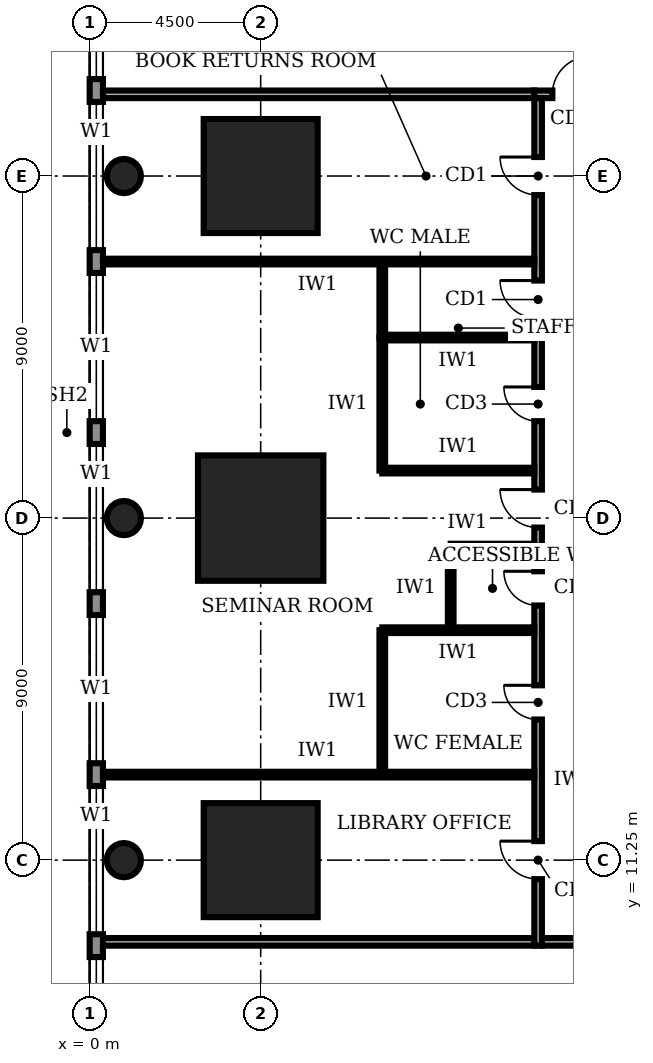
"""IFC4 building model, lengths in metres.
Left out: names, types, materials, properties, quantities, classifications, styles, units other than length and angle.
Written with IfcOpenShell. Run it as: python <this file> out.ifc"""

import sys

from ifc_helpers import new_model, si_unit, direction, frame, frame_2d, origin, origin_2d, place, context, subcontext, project, spatial, rectangle, circle, extrude, element, fill, save


model = new_model("IFC4")
c1 = context("Model", 3, precision=1e-05, world=origin(), true_north=direction((0.0, 1.0)))
c2 = subcontext(c1, "Body", "Model", "MODEL_VIEW")
j1 = project(units=[si_unit("LENGTHUNIT", "METRE"), si_unit("PLANEANGLEUNIT", "RADIAN")], contexts=[c1])
p1 = place(None, origin())
s1 = spatial("IfcSite", under=j1, at=p1, CompositionType="ELEMENT")
p2 = place(p1, origin())
s2 = spatial("IfcBuilding", under=s1, at=p2, CompositionType="ELEMENT")
p3 = place(p2, frame((0.0, 0.0, 11.0)))
s3 = spatial("IfcBuildingStorey", under=s2, at=p3, CompositionType="ELEMENT", Elevation=11.0)
p4 = place(p3, frame((4.5, 11.25, 0.0), z_axis=(0.0, 0.0, 1.0), x_axis=(1.0, 0.0, 0.0)))
e1 = element("IfcColumn", 1, at=p4, inside=s3, PredefinedType="COLUMN", context=c2, shape_type="SweptSolid", body=[
    extrude(rectangle(XDim=3.0, YDim=3.0, at=origin_2d()), origin(), (0.0, 0.0, 1.0), 5.0),
])
p5 = place(p3, frame((4.5, 20.25, 0.0), z_axis=(0.0, 0.0, 1.0), x_axis=(1.0, 0.0, 0.0)))
e2 = element("IfcColumn", 2, at=p5, inside=s3, PredefinedType="COLUMN", context=c2, shape_type="SweptSolid", body=[
    extrude(rectangle(XDim=3.3, YDim=3.3, at=origin_2d()), origin(), (0.0, 0.0, 1.0), 5.0),
])
p6 = place(p3, frame((4.5, 29.25, 0.0), z_axis=(0.0, 0.0, 1.0), x_axis=(1.0, 0.0, 0.0)))
e3 = element("IfcColumn", 3, at=p6, inside=s3, PredefinedType="COLUMN", context=c2, shape_type="SweptSolid", body=[
    extrude(rectangle(XDim=3.0, YDim=3.0, at=origin_2d()), origin(), (0.0, 0.0, 1.0), 5.0),
])
for number, where, z_axis, x_axis in (
    (4, (0.9, 11.25, 0.0), (0.0, 0.0, 1.0), (1.0, 0.0, 0.0)),
    (5, (0.9, 20.25, 0.0), (0.0, 0.0, 1.0), (1.0, 0.0, 0.0)),
    (6, (0.9, 29.25, 0.0), (0.0, 0.0, 1.0), (1.0, 0.0, 0.0)),
):
    element("IfcColumn", number, at=place(p3, frame(where, z_axis=z_axis, x_axis=x_axis)), inside=s3, PredefinedType="COLUMN", context=c2, shape_type="SweptSolid", body=[
        extrude(circle(Radius=0.45, at=origin_2d()), origin(), (0.0, 0.0, 1.0), 5.0),
    ])
p7 = place(p3, frame((0.175, 49.48, 0.0), z_axis=(0.0, 0.0, 1.0), x_axis=(0.0, -1.0, 0.0)))
e7 = element("IfcWall", 7, at=p7, inside=s3, PredefinedType="STANDARD", context=c2, shape_type="SweptSolid", body=[
    extrude(rectangle(XDim=53.96, YDim=0.35, at=frame_2d((26.98, 0.0))), origin(), (0.0, 0.0, 1.0), 4.7),
])
p8 = place(p7, frame((49.71, 0.0, 0.9)))
e8 = element("IfcOpeningElement", 8, at=p8, cuts=e7, PredefinedType="OPENING", context=c2, shape_type="SweptSolid", body=[
    extrude(rectangle(XDim=3.9, YDim=2.2, at=frame_2d((1.95, 1.1))), frame((0.0, 0.185, 0.0), z_axis=(0.0, -1.0, 0.0), x_axis=(1.0, 0.0, 0.0)), (0.0, 0.0, 1.0), 0.37),
])
p9 = place(p7, frame((45.28, 0.0, 0.9)))
e9 = element("IfcOpeningElement", 9, at=p9, cuts=e7, PredefinedType="OPENING", context=c2, shape_type="SweptSolid", body=[
    extrude(rectangle(XDim=3.9, YDim=2.2, at=frame_2d((1.95, 1.1))), frame((0.0, 0.185, 0.0), z_axis=(0.0, -1.0, 0.0), x_axis=(1.0, 0.0, 0.0)), (0.0, 0.0, 1.0), 0.37),
])
p10 = place(p7, frame((40.78, 0.0, 0.9)))
e10 = element("IfcOpeningElement", 10, at=p10, cuts=e7, PredefinedType="OPENING", context=c2, shape_type="SweptSolid", body=[
    extrude(rectangle(XDim=3.9, YDim=2.2, at=frame_2d((1.95, 1.1))), frame((0.0, 0.185, 0.0), z_axis=(0.0, -1.0, 0.0), x_axis=(1.0, 0.0, 0.0)), (0.0, 0.0, 1.0), 0.37),
])
p11 = place(p7, frame((36.28, 0.0, 0.9)))
e11 = element("IfcOpeningElement", 11, at=p11, cuts=e7, PredefinedType="OPENING", context=c2, shape_type="SweptSolid", body=[
    extrude(rectangle(XDim=3.9, YDim=2.2, at=frame_2d((1.95, 1.1))), frame((0.0, 0.185, 0.0), z_axis=(0.0, -1.0, 0.0), x_axis=(1.0, 0.0, 0.0)), (0.0, 0.0, 1.0), 0.37),
])
p12 = place(p7, frame((31.78, 0.0, 0.9)))
e12 = element("IfcOpeningElement", 12, at=p12, cuts=e7, PredefinedType="OPENING", context=c2, shape_type="SweptSolid", body=[
    extrude(rectangle(XDim=3.9, YDim=2.2, at=frame_2d((1.95, 1.1))), frame((0.0, 0.185, 0.0), z_axis=(0.0, -1.0, 0.0), x_axis=(1.0, 0.0, 0.0)), (0.0, 0.0, 1.0), 0.37),
])
p13 = place(p7, frame((27.28, 0.0, 0.9)))
e13 = element("IfcOpeningElement", 13, at=p13, cuts=e7, PredefinedType="OPENING", context=c2, shape_type="SweptSolid", body=[
    extrude(rectangle(XDim=3.9, YDim=2.2, at=frame_2d((1.95, 1.1))), frame((0.0, 0.185, 0.0), z_axis=(0.0, -1.0, 0.0), x_axis=(1.0, 0.0, 0.0)), (0.0, 0.0, 1.0), 0.37),
])
p14 = place(p7, frame((22.78, 0.0, 0.9)))
e14 = element("IfcOpeningElement", 14, at=p14, cuts=e7, PredefinedType="OPENING", context=c2, shape_type="SweptSolid", body=[
    extrude(rectangle(XDim=3.9, YDim=2.2, at=frame_2d((1.95, 1.1))), frame((0.0, 0.185, 0.0), z_axis=(0.0, -1.0, 0.0), x_axis=(1.0, 0.0, 0.0)), (0.0, 0.0, 1.0), 0.37),
])
p15 = place(p7, frame((18.28, 0.0, 0.9)))
e15 = element("IfcOpeningElement", 15, at=p15, cuts=e7, PredefinedType="OPENING", context=c2, shape_type="SweptSolid", body=[
    extrude(rectangle(XDim=3.9, YDim=2.2, at=frame_2d((1.95, 1.1))), frame((0.0, 0.185, 0.0), z_axis=(0.0, -1.0, 0.0), x_axis=(1.0, 0.0, 0.0)), (0.0, 0.0, 1.0), 0.37),
])
p16 = place(p7, frame((13.78, 0.0, 0.9)))
e16 = element("IfcOpeningElement", 16, at=p16, cuts=e7, PredefinedType="OPENING", context=c2, shape_type="SweptSolid", body=[
    extrude(rectangle(XDim=3.9, YDim=2.2, at=frame_2d((1.95, 1.1))), frame((0.0, 0.185, 0.0), z_axis=(0.0, -1.0, 0.0), x_axis=(1.0, 0.0, 0.0)), (0.0, 0.0, 1.0), 0.37),
])
p17 = place(p7, frame((9.28, 0.0, 0.9)))
e17 = element("IfcOpeningElement", 17, at=p17, cuts=e7, PredefinedType="OPENING", context=c2, shape_type="SweptSolid", body=[
    extrude(rectangle(XDim=3.9, YDim=2.2, at=frame_2d((1.95, 1.1))), frame((0.0, 0.185, 0.0), z_axis=(0.0, -1.0, 0.0), x_axis=(1.0, 0.0, 0.0)), (0.0, 0.0, 1.0), 0.37),
])
p18 = place(p7, frame((4.78, 0.0, 0.9)))
e18 = element("IfcOpeningElement", 18, at=p18, cuts=e7, PredefinedType="OPENING", context=c2, shape_type="SweptSolid", body=[
    extrude(rectangle(XDim=3.9, YDim=2.2, at=frame_2d((1.95, 1.1))), frame((0.0, 0.185, 0.0), z_axis=(0.0, -1.0, 0.0), x_axis=(1.0, 0.0, 0.0)), (0.0, 0.0, 1.0), 0.37),
])
p19 = place(p3, frame((11.9, 9.1, 0.0), z_axis=(0.0, 0.0, 1.0), x_axis=(1.0, 0.0, 0.0)))
e19 = element("IfcWall", 19, at=p19, inside=s3, PredefinedType="SOLIDWALL", context=c2, shape_type="SweptSolid", body=[
    extrude(rectangle(XDim=16.9, YDim=0.2, at=frame_2d((8.45, 0.0))), origin(), (0.0, 0.0, 1.0), 4.7),
])
p20 = place(p19, frame((2.05, 0.0, 0.0)))
e20 = element("IfcOpeningElement", 20, at=p20, cuts=e19, PredefinedType="OPENING", context=c2, shape_type="SweptSolid", body=[
    extrude(rectangle(XDim=1.8, YDim=2.1, at=frame_2d((0.9, 1.05))), frame((0.0, 0.11, 0.0), z_axis=(0.0, -1.0, 0.0), x_axis=(1.0, 0.0, 0.0)), (0.0, 0.0, 1.0), 0.22),
])
p21 = place(p19, frame((9.7, 0.0, 0.0)))
e21 = element("IfcOpeningElement", 21, at=p21, cuts=e19, PredefinedType="OPENING", context=c2, shape_type="SweptSolid", body=[
    extrude(rectangle(XDim=1.8, YDim=2.1, at=frame_2d((0.9, 1.05))), frame((0.0, 0.11, 0.0), z_axis=(0.0, -1.0, 0.0), x_axis=(1.0, 0.0, 0.0)), (0.0, 0.0, 1.0), 0.22),
])
p22 = place(p19, frame((15.425, 0.0, 0.0)))
e22 = element("IfcOpeningElement", 22, at=p22, cuts=e19, PredefinedType="OPENING", context=c2, shape_type="SweptSolid", body=[
    extrude(rectangle(XDim=1.0, YDim=2.1, at=frame_2d((0.5, 1.05))), frame((0.0, 0.11, 0.0), z_axis=(0.0, -1.0, 0.0), x_axis=(1.0, 0.0, 0.0)), (0.0, 0.0, 1.0), 0.22),
])
p23 = place(p3, frame((28.6, 31.4, 0.0), z_axis=(0.0, 0.0, 1.0), x_axis=(-1.0, 0.0, 0.0)))
e23 = element("IfcWall", 23, at=p23, inside=s3, PredefinedType="SOLIDWALL", context=c2, shape_type="SweptSolid", body=[
    extrude(rectangle(XDim=16.9, YDim=0.2, at=frame_2d((8.45, 0.0))), origin(), (0.0, 0.0, 1.0), 4.7),
])
p24 = place(p23, frame((15.425, 0.0, 0.0)))
e24 = element("IfcOpeningElement", 24, at=p24, cuts=e23, PredefinedType="OPENING", context=c2, shape_type="SweptSolid", body=[
    extrude(rectangle(XDim=1.0, YDim=2.1, at=frame_2d((0.5, 1.05))), frame((0.0, 0.11, 0.0), z_axis=(0.0, -1.0, 0.0), x_axis=(1.0, 0.0, 0.0)), (0.0, 0.0, 1.0), 0.22),
])
p25 = place(p23, frame((9.7, 0.0, 0.0)))
e25 = element("IfcOpeningElement", 25, at=p25, cuts=e23, PredefinedType="OPENING", context=c2, shape_type="SweptSolid", body=[
    extrude(rectangle(XDim=1.8, YDim=2.1, at=frame_2d((0.9, 1.05))), frame((0.0, 0.11, 0.0), z_axis=(0.0, -1.0, 0.0), x_axis=(1.0, 0.0, 0.0)), (0.0, 0.0, 1.0), 0.22),
])
p26 = place(p23, frame((3.35, 0.0, 0.0)))
e26 = element("IfcOpeningElement", 26, at=p26, cuts=e23, PredefinedType="OPENING", context=c2, shape_type="SweptSolid", body=[
    extrude(rectangle(XDim=1.0, YDim=2.1, at=frame_2d((0.5, 1.05))), frame((0.0, 0.11, 0.0), z_axis=(0.0, -1.0, 0.0), x_axis=(1.0, 0.0, 0.0)), (0.0, 0.0, 1.0), 0.22),
])
p27 = place(p23, frame((0.275, 0.0, 0.0)))
e27 = element("IfcOpeningElement", 27, at=p27, cuts=e23, PredefinedType="OPENING", context=c2, shape_type="SweptSolid", body=[
    extrude(rectangle(XDim=1.0, YDim=2.1, at=frame_2d((0.5, 1.05))), frame((0.0, 0.11, 0.0), z_axis=(0.0, -1.0, 0.0), x_axis=(1.0, 0.0, 0.0)), (0.0, 0.0, 1.0), 0.22),
])
p28 = place(p3, frame((11.8, 31.3, 0.0), z_axis=(0.0, 0.0, 1.0), x_axis=(0.0, -1.0, 0.0)))
e28 = element("IfcWall", 28, at=p28, inside=s3, PredefinedType="SOLIDWALL", context=c2, shape_type="SweptSolid", body=[
    extrude(rectangle(XDim=22.3, YDim=0.2, at=frame_2d((11.15, 0.0))), origin(), (0.0, 0.0, 1.0), 4.7),
])
p29 = place(p28, frame((19.55, 0.0, 0.0)))
e29 = element("IfcOpeningElement", 29, at=p29, cuts=e28, PredefinedType="OPENING", context=c2, shape_type="SweptSolid", body=[
    extrude(rectangle(XDim=1.0, YDim=2.1, at=frame_2d((0.5, 1.05))), frame((0.0, 0.11, 0.0), z_axis=(0.0, -1.0, 0.0), x_axis=(1.0, 0.0, 0.0)), (0.0, 0.0, 1.0), 0.22),
])
p30 = place(p28, frame((15.45, 0.0, 0.0)))
e30 = element("IfcOpeningElement", 30, at=p30, cuts=e28, PredefinedType="OPENING", context=c2, shape_type="SweptSolid", body=[
    extrude(rectangle(XDim=0.9, YDim=2.1, at=frame_2d((0.45, 1.05))), frame((0.0, 0.11, 0.0), z_axis=(0.0, -1.0, 0.0), x_axis=(1.0, 0.0, 0.0)), (0.0, 0.0, 1.0), 0.22),
])
p31 = place(p28, frame((12.45, 0.0, 0.0)))
e31 = element("IfcOpeningElement", 31, at=p31, cuts=e28, PredefinedType="OPENING", context=c2, shape_type="SweptSolid", body=[
    extrude(rectangle(XDim=0.9, YDim=2.1, at=frame_2d((0.45, 1.05))), frame((0.0, 0.11, 0.0), z_axis=(0.0, -1.0, 0.0), x_axis=(1.0, 0.0, 0.0)), (0.0, 0.0, 1.0), 0.22),
])
p32 = place(p28, frame((7.6, 0.0, 0.0)))
e32 = element("IfcOpeningElement", 32, at=p32, cuts=e28, PredefinedType="OPENING", context=c2, shape_type="SweptSolid", body=[
    extrude(rectangle(XDim=0.9, YDim=2.1, at=frame_2d((0.45, 1.05))), frame((0.0, 0.11, 0.0), z_axis=(0.0, -1.0, 0.0), x_axis=(1.0, 0.0, 0.0)), (0.0, 0.0, 1.0), 0.22),
])
p33 = place(p28, frame((4.8, 0.0, 0.0)))
e33 = element("IfcOpeningElement", 33, at=p33, cuts=e28, PredefinedType="OPENING", context=c2, shape_type="SweptSolid", body=[
    extrude(rectangle(XDim=1.0, YDim=2.1, at=frame_2d((0.5, 1.05))), frame((0.0, 0.11, 0.0), z_axis=(0.0, -1.0, 0.0), x_axis=(1.0, 0.0, 0.0)), (0.0, 0.0, 1.0), 0.22),
])
p34 = place(p28, frame((10.3, 0.0, 0.0)))
e34 = element("IfcOpeningElement", 34, at=p34, cuts=e28, PredefinedType="OPENING", context=c2, shape_type="SweptSolid", body=[
    extrude(rectangle(XDim=1.0, YDim=2.1, at=frame_2d((0.5, 1.05))), frame((0.0, 0.11, 0.0), z_axis=(0.0, -1.0, 0.0), x_axis=(1.0, 0.0, 0.0)), (0.0, 0.0, 1.0), 0.22),
])
p35 = place(p28, frame((1.55, 0.0, 0.0)))
e35 = element("IfcOpeningElement", 35, at=p35, cuts=e28, PredefinedType="OPENING", context=c2, shape_type="SweptSolid", body=[
    extrude(rectangle(XDim=1.0, YDim=2.1, at=frame_2d((0.5, 1.05))), frame((0.0, 0.11, 0.0), z_axis=(0.0, -1.0, 0.0), x_axis=(1.0, 0.0, 0.0)), (0.0, 0.0, 1.0), 0.22),
])
for number, where, z_axis, x_axis in (
    (36, (0.3, 9.1, 0.0), (0.0, 0.0, 1.0), (1.0, 0.0, 0.0)),
    (37, (0.3, 31.4, 0.0), (0.0, 0.0, 1.0), (1.0, 0.0, 0.0)),
):
    element("IfcWall", number, at=place(p3, frame(where, z_axis=z_axis, x_axis=x_axis)), inside=s3, PredefinedType="SOLIDWALL", context=c2, shape_type="SweptSolid", body=[
        extrude(rectangle(XDim=11.4, YDim=0.2, at=frame_2d((5.7, 0.0))), origin(), (0.0, 0.0, 1.0), 4.7),
    ])
for number, where, z_axis, x_axis in (
    (38, (0.3, 13.5, 0.0), (0.0, 0.0, 1.0), (1.0, 0.0, 0.0)),
    (39, (0.3, 27.0, 0.0), (0.0, 0.0, 1.0), (1.0, 0.0, 0.0)),
):
    element("IfcWall", number, at=place(p3, frame(where, z_axis=z_axis, x_axis=x_axis)), inside=s3, PredefinedType="PARTITIONING", context=c2, shape_type="SweptSolid", body=[
        extrude(rectangle(XDim=11.4, YDim=0.15, at=frame_2d((5.7, 0.0))), origin(), (0.0, 0.0, 1.0), 4.7),
    ])
p36 = place(p3, frame((11.7, 17.3, 0.0), z_axis=(0.0, 0.0, 1.0), x_axis=(-1.0, 0.0, 0.0)))
e40 = element("IfcWall", 40, at=p36, inside=s3, PredefinedType="PARTITIONING", context=c2, shape_type="SweptSolid", body=[
    extrude(rectangle(XDim=4.0, YDim=0.15, at=frame_2d((2.0, 0.0))), origin(), (0.0, 0.0, 1.0), 4.7),
])
p37 = place(p3, frame((11.7, 19.5, 0.0), z_axis=(0.0, 0.0, 1.0), x_axis=(-1.0, 0.0, 0.0)))
e41 = element("IfcWall", 41, at=p37, inside=s3, PredefinedType="PARTITIONING", context=c2, shape_type="SweptSolid", body=[
    extrude(rectangle(XDim=2.2, YDim=0.15, at=frame_2d((1.1, 0.0))), origin(), (0.0, 0.0, 1.0), 4.7),
])
for number, where, z_axis, x_axis in (
    (42, (11.7, 21.5, 0.0), (0.0, 0.0, 1.0), (-1.0, 0.0, 0.0)),
    (43, (11.7, 25.0, 0.0), (0.0, 0.0, 1.0), (-1.0, 0.0, 0.0)),
):
    element("IfcWall", number, at=place(p3, frame(where, z_axis=z_axis, x_axis=x_axis)), inside=s3, PredefinedType="PARTITIONING", context=c2, shape_type="SweptSolid", body=[
        extrude(rectangle(XDim=4.0, YDim=0.15, at=frame_2d((2.0, 0.0))), origin(), (0.0, 0.0, 1.0), 4.7),
    ])
p38 = place(p3, frame((7.7, 13.5, 0.0), z_axis=(0.0, 0.0, 1.0), x_axis=(0.0, 1.0, 0.0)))
e44 = element("IfcWall", 44, at=p38, inside=s3, PredefinedType="PARTITIONING", context=c2, shape_type="SweptSolid", body=[
    extrude(rectangle(XDim=3.8, YDim=0.15, at=frame_2d((1.9, 0.0))), origin(), (0.0, 0.0, 1.0), 4.7),
])
p39 = place(p3, frame((9.5, 17.3, 0.0), z_axis=(0.0, 0.0, 1.0), x_axis=(0.0, 1.0, 0.0)))
e45 = element("IfcWall", 45, at=p39, inside=s3, PredefinedType="PARTITIONING", context=c2, shape_type="SweptSolid", body=[
    extrude(rectangle(XDim=2.2, YDim=0.15, at=frame_2d((1.1, 0.0))), origin(), (0.0, 0.0, 1.0), 4.7),
])
p40 = place(p3, frame((7.7, 21.5, 0.0), z_axis=(0.0, 0.0, 1.0), x_axis=(0.0, 1.0, 0.0)))
e46 = element("IfcWall", 46, at=p40, inside=s3, PredefinedType="PARTITIONING", context=c2, shape_type="SweptSolid", body=[
    extrude(rectangle(XDim=3.5, YDim=0.15, at=frame_2d((1.75, 0.0))), origin(), (0.0, 0.0, 1.0), 4.7),
])
p41 = place(p3, frame((7.7, 25.0, 0.0), z_axis=(0.0, 0.0, 1.0), x_axis=(0.0, 1.0, 0.0)))
e47 = element("IfcWall", 47, at=p41, inside=s3, PredefinedType="PARTITIONING", context=c2, shape_type="SweptSolid", body=[
    extrude(rectangle(XDim=2.0, YDim=0.15, at=frame_2d((1.0, 0.0))), origin(), (0.0, 0.0, 1.0), 4.7),
])
p42 = place(p10, origin())
e48 = element("IfcWindow", 48, at=p42, inside=s3, PartitioningType="SINGLE_PANEL", PredefinedType="WINDOW", context=c2, shape_type="SweptSolid", body=[
    extrude(rectangle(XDim=3.9, YDim=2.2, at=frame_2d((1.95, 1.1))), frame((0.0, 0.03, 0.0), z_axis=(0.0, -1.0, 0.0), x_axis=(1.0, 0.0, 0.0)), (0.0, 0.0, 1.0), 0.06),
])
fill(e10, e48)
p43 = place(p11, origin())
e49 = element("IfcWindow", 49, at=p43, inside=s3, PartitioningType="SINGLE_PANEL", PredefinedType="WINDOW", context=c2, shape_type="SweptSolid", body=[
    extrude(rectangle(XDim=3.9, YDim=2.2, at=frame_2d((1.95, 1.1))), frame((0.0, 0.03, 0.0), z_axis=(0.0, -1.0, 0.0), x_axis=(1.0, 0.0, 0.0)), (0.0, 0.0, 1.0), 0.06),
])
fill(e11, e49)
p44 = place(p12, origin())
e50 = element("IfcWindow", 50, at=p44, inside=s3, PartitioningType="SINGLE_PANEL", PredefinedType="WINDOW", context=c2, shape_type="SweptSolid", body=[
    extrude(rectangle(XDim=3.9, YDim=2.2, at=frame_2d((1.95, 1.1))), frame((0.0, 0.03, 0.0), z_axis=(0.0, -1.0, 0.0), x_axis=(1.0, 0.0, 0.0)), (0.0, 0.0, 1.0), 0.06),
])
fill(e12, e50)
p45 = place(p13, origin())
e51 = element("IfcWindow", 51, at=p45, inside=s3, PartitioningType="SINGLE_PANEL", PredefinedType="WINDOW", context=c2, shape_type="SweptSolid", body=[
    extrude(rectangle(XDim=3.9, YDim=2.2, at=frame_2d((1.95, 1.1))), frame((0.0, 0.03, 0.0), z_axis=(0.0, -1.0, 0.0), x_axis=(1.0, 0.0, 0.0)), (0.0, 0.0, 1.0), 0.06),
])
fill(e13, e51)
p46 = place(p14, origin())
e52 = element("IfcWindow", 52, at=p46, inside=s3, PartitioningType="SINGLE_PANEL", PredefinedType="WINDOW", context=c2, shape_type="SweptSolid", body=[
    extrude(rectangle(XDim=3.9, YDim=2.2, at=frame_2d((1.95, 1.1))), frame((0.0, 0.03, 0.0), z_axis=(0.0, -1.0, 0.0), x_axis=(1.0, 0.0, 0.0)), (0.0, 0.0, 1.0), 0.06),
])
fill(e14, e52)
p47 = place(p15, origin())
e53 = element("IfcWindow", 53, at=p47, inside=s3, PartitioningType="SINGLE_PANEL", PredefinedType="WINDOW", context=c2, shape_type="SweptSolid", body=[
    extrude(rectangle(XDim=3.9, YDim=2.2, at=frame_2d((1.95, 1.1))), frame((0.0, 0.03, 0.0), z_axis=(0.0, -1.0, 0.0), x_axis=(1.0, 0.0, 0.0)), (0.0, 0.0, 1.0), 0.06),
])
fill(e15, e53)
p48 = place(p16, origin())
e54 = element("IfcWindow", 54, at=p48, inside=s3, PartitioningType="SINGLE_PANEL", PredefinedType="WINDOW", context=c2, shape_type="SweptSolid", body=[
    extrude(rectangle(XDim=3.9, YDim=2.2, at=frame_2d((1.95, 1.1))), frame((0.0, 0.03, 0.0), z_axis=(0.0, -1.0, 0.0), x_axis=(1.0, 0.0, 0.0)), (0.0, 0.0, 1.0), 0.06),
])
fill(e16, e54)
p49 = place(p24, frame((1.0, 0.0, 0.0), z_axis=(0.0, 0.0, 1.0), x_axis=(-1.0, 0.0, 0.0)))
e55 = element("IfcDoor", 55, at=p49, inside=s3, OperationType="SINGLE_SWING_RIGHT", PredefinedType="DOOR", context=c2, shape_type="SweptSolid", body=[
    extrude(rectangle(XDim=1.0, YDim=2.1, at=frame_2d((0.5, 1.05))), frame((0.0, 0.025, 0.0), z_axis=(0.0, -1.0, 0.0), x_axis=(1.0, 0.0, 0.0)), (0.0, 0.0, 1.0), 0.05),
])
fill(e24, e55)
p50 = place(p29, frame((1.0, 0.0, 0.0), z_axis=(0.0, 0.0, 1.0), x_axis=(-1.0, 0.0, 0.0)))
e56 = element("IfcDoor", 56, at=p50, inside=s3, OperationType="SINGLE_SWING_RIGHT", PredefinedType="DOOR", context=c2, shape_type="SweptSolid", body=[
    extrude(rectangle(XDim=1.0, YDim=2.1, at=frame_2d((0.5, 1.05))), frame((0.0, 0.025, 0.0), z_axis=(0.0, -1.0, 0.0), x_axis=(1.0, 0.0, 0.0)), (0.0, 0.0, 1.0), 0.05),
])
fill(e29, e56)
p51 = place(p30, frame((0.9, 0.0, 0.0), z_axis=(0.0, 0.0, 1.0), x_axis=(-1.0, 0.0, 0.0)))
e57 = element("IfcDoor", 57, at=p51, inside=s3, OperationType="SINGLE_SWING_RIGHT", PredefinedType="DOOR", context=c2, shape_type="SweptSolid", body=[
    extrude(rectangle(XDim=0.9, YDim=2.1, at=frame_2d((0.45, 1.05))), frame((0.0, 0.025, 0.0), z_axis=(0.0, -1.0, 0.0), x_axis=(1.0, 0.0, 0.0)), (0.0, 0.0, 1.0), 0.05),
])
fill(e30, e57)
p52 = place(p31, frame((0.9, 0.0, 0.0), z_axis=(0.0, 0.0, 1.0), x_axis=(-1.0, 0.0, 0.0)))
e58 = element("IfcDoor", 58, at=p52, inside=s3, OperationType="SINGLE_SWING_RIGHT", PredefinedType="DOOR", context=c2, shape_type="SweptSolid", body=[
    extrude(rectangle(XDim=0.9, YDim=2.1, at=frame_2d((0.45, 1.05))), frame((0.0, 0.025, 0.0), z_axis=(0.0, -1.0, 0.0), x_axis=(1.0, 0.0, 0.0)), (0.0, 0.0, 1.0), 0.05),
])
fill(e31, e58)
p53 = place(p32, frame((0.9, 0.0, 0.0), z_axis=(0.0, 0.0, 1.0), x_axis=(-1.0, 0.0, 0.0)))
e59 = element("IfcDoor", 59, at=p53, inside=s3, OperationType="SINGLE_SWING_RIGHT", PredefinedType="DOOR", context=c2, shape_type="SweptSolid", body=[
    extrude(rectangle(XDim=0.9, YDim=2.1, at=frame_2d((0.45, 1.05))), frame((0.0, 0.025, 0.0), z_axis=(0.0, -1.0, 0.0), x_axis=(1.0, 0.0, 0.0)), (0.0, 0.0, 1.0), 0.05),
])
fill(e32, e59)
p54 = place(p33, frame((1.0, 0.0, 0.0), z_axis=(0.0, 0.0, 1.0), x_axis=(-1.0, 0.0, 0.0)))
e60 = element("IfcDoor", 60, at=p54, inside=s3, OperationType="SINGLE_SWING_RIGHT", PredefinedType="DOOR", context=c2, shape_type="SweptSolid", body=[
    extrude(rectangle(XDim=1.0, YDim=2.1, at=frame_2d((0.5, 1.05))), frame((0.0, 0.025, 0.0), z_axis=(0.0, -1.0, 0.0), x_axis=(1.0, 0.0, 0.0)), (0.0, 0.0, 1.0), 0.05),
])
fill(e33, e60)
p55 = place(p34, frame((1.0, 0.0, 0.0), z_axis=(0.0, 0.0, 1.0), x_axis=(-1.0, 0.0, 0.0)))
e61 = element("IfcDoor", 61, at=p55, inside=s3, OperationType="SINGLE_SWING_RIGHT", PredefinedType="DOOR", context=c2, shape_type="SweptSolid", body=[
    extrude(rectangle(XDim=1.0, YDim=2.1, at=frame_2d((0.5, 1.05))), frame((0.0, 0.025, 0.0), z_axis=(0.0, -1.0, 0.0), x_axis=(1.0, 0.0, 0.0)), (0.0, 0.0, 1.0), 0.05),
])
fill(e34, e61)
p56 = place(p35, frame((1.0, 0.0, 0.0), z_axis=(0.0, 0.0, 1.0), x_axis=(-1.0, 0.0, 0.0)))
e62 = element("IfcDoor", 62, at=p56, inside=s3, OperationType="SINGLE_SWING_RIGHT", PredefinedType="DOOR", context=c2, shape_type="SweptSolid", body=[
    extrude(rectangle(XDim=1.0, YDim=2.1, at=frame_2d((0.5, 1.05))), frame((0.0, 0.025, 0.0), z_axis=(0.0, -1.0, 0.0), x_axis=(1.0, 0.0, 0.0)), (0.0, 0.0, 1.0), 0.05),
])
fill(e35, e62)
save(model, sys.argv[1])
